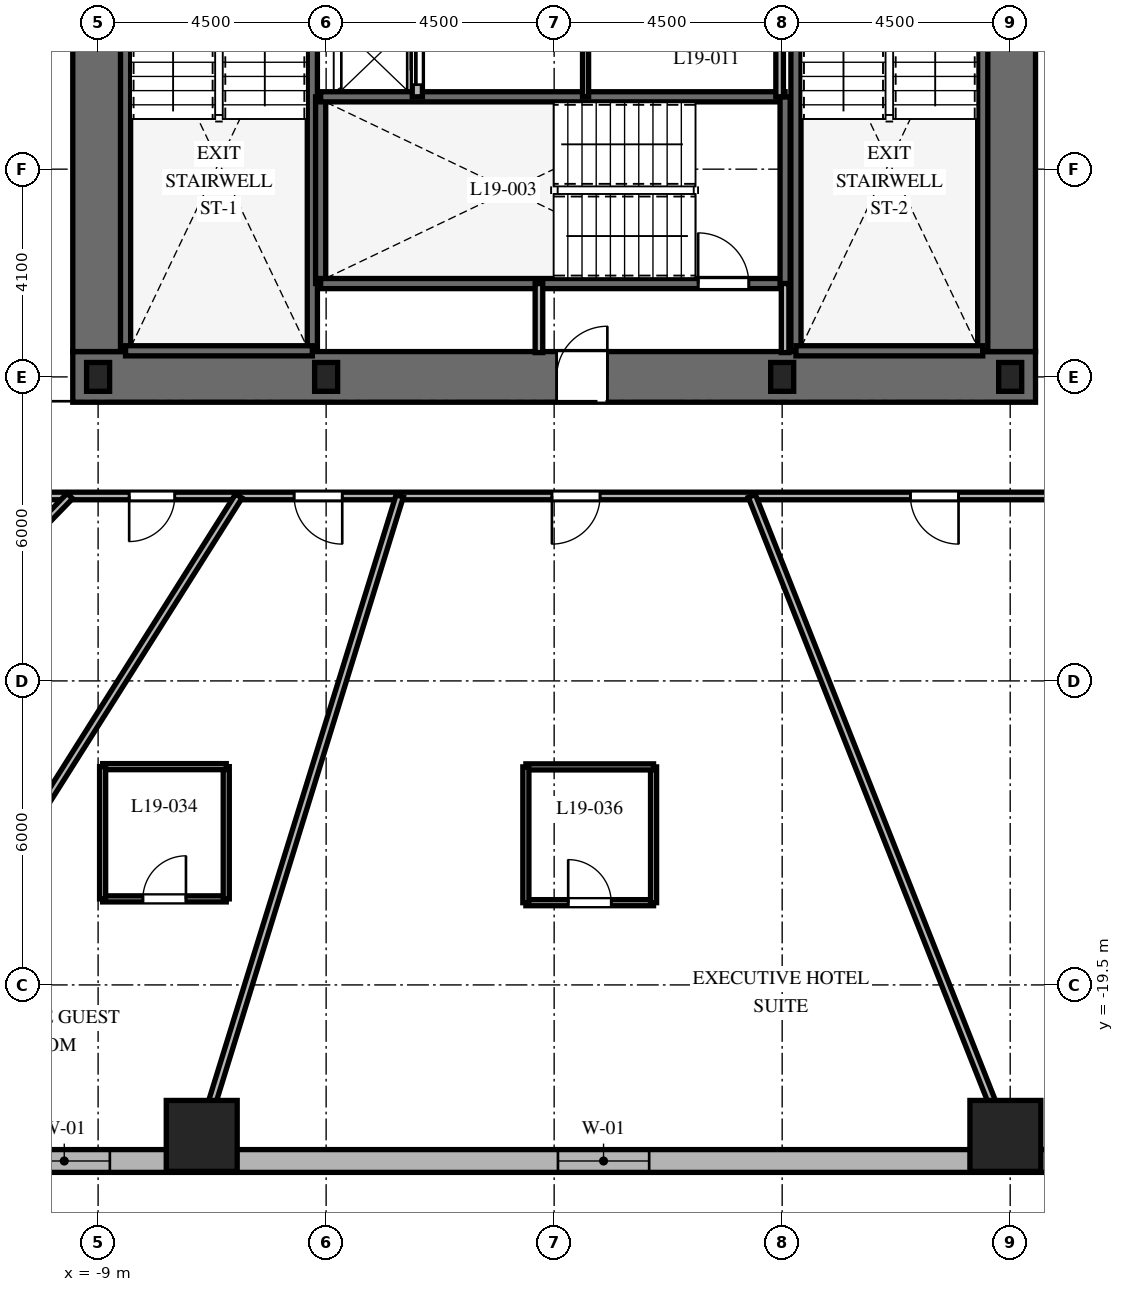
"""IFC4 building model, lengths in metres.
Left out: names, types, materials, properties, quantities, classifications, styles, units other than length and angle.
Written with IfcOpenShell. Run it as: python <this file> out.ifc"""

import sys

from ifc_helpers import new_model, si_unit, direction, frame, frame_2d, origin, origin_2d, place, context, subcontext, project, spatial, rectangle, i_section, extrude, element, fill, save


model = new_model("IFC4")
c1 = context("Model", 3, precision=1e-05, world=origin(), true_north=direction((0.0, 1.0)))
c2 = subcontext(c1, "Body", "Model", "MODEL_VIEW")
j1 = project(units=[si_unit("LENGTHUNIT", "METRE"), si_unit("PLANEANGLEUNIT", "RADIAN")], contexts=[c1])
p1 = place(None, origin())
s1 = spatial("IfcSite", under=j1, at=p1, CompositionType="ELEMENT")
p2 = place(p1, origin())
s2 = spatial("IfcBuilding", under=s1, at=p2, CompositionType="ELEMENT")
p3 = place(p2, frame((0.0, 0.0, 82.3)))
s3 = spatial("IfcBuildingStorey", under=s2, at=p3, CompositionType="ELEMENT", Elevation=82.3)
p4 = place(p3, frame((-9.5, -7.5, 0.0), z_axis=(0.0, 0.0, 1.0), x_axis=(1.0, 0.0, 0.0)))
e1 = element("IfcWall", 1, at=p4, inside=s3, PredefinedType="SHEAR", context=c2, shape_type="SweptSolid", body=[
    extrude(rectangle(XDim=19.0, YDim=1.0, at=frame_2d((9.5, 0.0))), origin(), (0.0, 0.0, 1.0), 3.7),
])
p5 = place(p4, frame((9.55, 0.0, 0.0)))
e2 = element("IfcOpeningElement", 2, at=p5, cuts=e1, PredefinedType="OPENING", context=c2, shape_type="SweptSolid", body=[
    extrude(rectangle(XDim=1.0, YDim=2.15, at=frame_2d((0.5, 1.075))), frame((0.0, 0.51, 0.0), z_axis=(0.0, -1.0, 0.0), x_axis=(1.0, 0.0, 0.0)), (0.0, 0.0, 1.0), 1.02),
])
p6 = place(p3, frame((-9.0, -7.0, 0.0), z_axis=(0.0, 0.0, 1.0), x_axis=(0.0, 1.0, 0.0)))
e3 = element("IfcWall", 3, at=p6, inside=s3, PredefinedType="SHEAR", context=c2, shape_type="SweptSolid", body=[
    extrude(rectangle(XDim=14.0, YDim=1.0, at=frame_2d((7.0, 0.0))), origin(), (0.0, 0.0, 1.0), 3.7),
])
p7 = place(p6, frame((10.125, 0.0, 0.0)))
e4 = element("IfcOpeningElement", 4, at=p7, cuts=e3, PredefinedType="OPENING", context=c2, shape_type="SweptSolid", body=[
    extrude(rectangle(XDim=1.05, YDim=2.15, at=frame_2d((0.525, 1.075))), frame((0.0, 0.51, 0.0), z_axis=(0.0, -1.0, 0.0), x_axis=(1.0, 0.0, 0.0)), (0.0, 0.0, 1.0), 1.02),
])
p8 = place(p3, frame((9.0, -7.0, 0.0), z_axis=(0.0, 0.0, 1.0), x_axis=(0.0, 1.0, 0.0)))
e5 = element("IfcWall", 5, at=p8, inside=s3, PredefinedType="SHEAR", context=c2, shape_type="SweptSolid", body=[
    extrude(rectangle(XDim=14.0, YDim=1.0, at=frame_2d((7.0, 0.0))), origin(), (0.0, 0.0, 1.0), 3.7),
])
p9 = place(p8, frame((10.125, 0.0, 0.0)))
e6 = element("IfcOpeningElement", 6, at=p9, cuts=e5, PredefinedType="OPENING", context=c2, shape_type="SweptSolid", body=[
    extrude(rectangle(XDim=1.05, YDim=2.15, at=frame_2d((0.525, 1.075))), frame((0.0, 0.51, 0.0), z_axis=(0.0, -1.0, 0.0), x_axis=(1.0, 0.0, 0.0)), (0.0, 0.0, 1.0), 1.02),
])
for number, where, z_axis, x_axis in (
    (7, (-8.458, -6.985, 0.0), (0.0, 0.0, 1.0), (0.0, 1.0, 0.0)),
    (8, (-4.772, -6.985, 0.0), (0.0, 0.0, 1.0), (0.0, 1.0, 0.0)),
):
    element("IfcWall", number, at=place(p3, frame(where, z_axis=z_axis, x_axis=x_axis)), inside=s3, PredefinedType="SHEAR", context=c2, shape_type="SweptSolid", body=[
        extrude(rectangle(XDim=9.143, YDim=0.2, at=frame_2d((4.572, 0.0))), origin(), (0.0, 0.0, 1.0), 3.7),
    ])
p10 = place(p3, frame((-8.458, -6.985, 0.0), z_axis=(0.0, 0.0, 1.0), x_axis=(1.0, 0.0, 0.0)))
e9 = element("IfcWall", 9, at=p10, inside=s3, PredefinedType="SHEAR", context=c2, shape_type="SweptSolid", body=[
    extrude(rectangle(XDim=3.686, YDim=0.2, at=frame_2d((1.843, 0.0))), origin(), (0.0, 0.0, 1.0), 3.7),
])
for number, where, z_axis, x_axis in (
    (10, (4.772, -6.985, 0.0), (0.0, 0.0, 1.0), (0.0, 1.0, 0.0)),
    (11, (8.458, -6.985, 0.0), (0.0, 0.0, 1.0), (0.0, 1.0, 0.0)),
):
    element("IfcWall", number, at=place(p3, frame(where, z_axis=z_axis, x_axis=x_axis)), inside=s3, PredefinedType="SHEAR", context=c2, shape_type="SweptSolid", body=[
        extrude(rectangle(XDim=9.143, YDim=0.2, at=frame_2d((4.572, 0.0))), origin(), (0.0, 0.0, 1.0), 3.7),
    ])
for number, where, z_axis, x_axis in (
    (12, (4.772, -6.985, 0.0), (0.0, 0.0, 1.0), (1.0, 0.0, 0.0)),
    (13, (-4.608, -5.658, 0.0), (0.0, 0.0, 1.0), (0.0, 1.0, 0.0)),
):
    element("IfcWall", number, at=place(p3, frame(where, z_axis=z_axis, x_axis=x_axis)), inside=s3, PredefinedType="SHEAR", context=c2, shape_type="SweptSolid", body=[
        extrude(rectangle(XDim=3.686, YDim=0.2, at=frame_2d((1.843, 0.0))), origin(), (0.0, 0.0, 1.0), 3.7),
    ])
p11 = place(p3, frame((-4.608, -5.658, 0.0), z_axis=(0.0, 0.0, 1.0), x_axis=(1.0, 0.0, 0.0)))
e14 = element("IfcWall", 14, at=p11, inside=s3, PredefinedType="SHEAR", context=c2, shape_type="SweptSolid", body=[
    extrude(rectangle(XDim=9.166, YDim=0.2, at=frame_2d((4.583, 0.0))), origin(), (0.0, 0.0, 1.0), 3.7),
])
p12 = place(p11, frame((7.45, 0.0, 0.0)))
e15 = element("IfcOpeningElement", 15, at=p12, cuts=e14, PredefinedType="OPENING", context=c2, shape_type="SweptSolid", body=[
    extrude(rectangle(XDim=1.0, YDim=2.15, at=frame_2d((0.5, 1.075))), frame((0.0, 0.11, 0.0), z_axis=(0.0, -1.0, 0.0), x_axis=(1.0, 0.0, 0.0)), (0.0, 0.0, 1.0), 0.22),
])
p13 = place(p3, frame((-4.608, -1.972, 0.0), z_axis=(0.0, 0.0, 1.0), x_axis=(1.0, 0.0, 0.0)))
e16 = element("IfcWall", 16, at=p13, inside=s3, PredefinedType="SHEAR", context=c2, shape_type="SweptSolid", body=[
    extrude(rectangle(XDim=9.166, YDim=0.2, at=frame_2d((4.583, 0.0))), origin(), (0.0, 0.0, 1.0), 3.7),
])
p14 = place(p3, frame((4.558, -5.658, 0.0), z_axis=(0.0, 0.0, 1.0), x_axis=(0.0, 1.0, 0.0)))
e17 = element("IfcWall", 17, at=p14, inside=s3, PredefinedType="SHEAR", context=c2, shape_type="SweptSolid", body=[
    extrude(rectangle(XDim=3.686, YDim=0.2, at=frame_2d((1.843, 0.0))), origin(), (0.0, 0.0, 1.0), 3.7),
])
for number, where, z_axis, x_axis in (
    (18, (-9.0, -7.5, 0.0), (0.0, 0.0, 1.0), (1.0, 0.0, 0.0)),
    (19, (-4.5, -7.5, 0.0), (0.0, 0.0, 1.0), (1.0, 0.0, 0.0)),
    (20, (4.5, -7.5, 0.0), (0.0, 0.0, 1.0), (1.0, 0.0, 0.0)),
    (21, (9.0, -7.5, 0.0), (0.0, 0.0, 1.0), (1.0, 0.0, 0.0)),
):
    element("IfcColumn", number, at=place(p3, frame(where, z_axis=z_axis, x_axis=x_axis)), inside=s3, PredefinedType="COLUMN", context=c2, shape_type="SweptSolid", body=[
        extrude(i_section(OverallWidth=0.454, OverallDepth=0.569, WebThickness=0.078, FlangeThickness=0.125, at=origin_2d()), origin(), (0.0, 0.0, 1.0), 3.7),
    ])
for number, where, z_axis, x_axis in (
    (22, (-6.955, -22.48, 0.0), (0.0, 0.0, 1.0), (1.0, 0.0, 0.0)),
    (23, (8.905, -22.48, 0.0), (0.0, 0.0, 1.0), (1.0, 0.0, 0.0)),
):
    element("IfcColumn", number, at=place(p3, frame(where, z_axis=z_axis, x_axis=x_axis)), inside=s3, PredefinedType="COLUMN", context=c2, shape_type="SweptSolid", body=[
        extrude(rectangle(XDim=1.4, YDim=1.4, at=origin_2d()), origin(), (0.0, 0.0, 1.0), 3.7),
    ])
p15 = place(p3, frame((-12.221, -22.975, 0.0), z_axis=(0.0, 0.0, 1.0), x_axis=(1.0, 0.0, 0.0)))
e24 = element("IfcWall", 24, at=p15, inside=s3, PredefinedType="SOLIDWALL", context=c2, shape_type="SweptSolid", body=[
    extrude(rectangle(XDim=26.389, YDim=0.45, at=frame_2d((13.195, 0.0))), origin(), (0.0, 0.0, 1.0), 3.38),
])
p16 = place(p15, frame((1.653, 0.0, 0.8)))
e25 = element("IfcOpeningElement", 25, at=p16, cuts=e24, PredefinedType="OPENING", context=c2, shape_type="SweptSolid", body=[
    extrude(rectangle(XDim=1.8, YDim=1.8, at=frame_2d((0.9, 0.9))), frame((0.0, 0.235, 0.0), z_axis=(0.0, -1.0, 0.0), x_axis=(1.0, 0.0, 0.0)), (0.0, 0.0, 1.0), 0.47),
])
p17 = place(p15, frame((12.296, 0.0, 0.8)))
e26 = element("IfcOpeningElement", 26, at=p17, cuts=e24, PredefinedType="OPENING", context=c2, shape_type="SweptSolid", body=[
    extrude(rectangle(XDim=1.8, YDim=1.8, at=frame_2d((0.9, 0.9))), frame((0.0, 0.235, 0.0), z_axis=(0.0, -1.0, 0.0), x_axis=(1.0, 0.0, 0.0)), (0.0, 0.0, 1.0), 0.47),
])
p18 = place(p15, frame((22.938, 0.0, 0.8)))
e27 = element("IfcOpeningElement", 27, at=p18, cuts=e24, PredefinedType="OPENING", context=c2, shape_type="SweptSolid", body=[
    extrude(rectangle(XDim=1.8, YDim=1.8, at=frame_2d((0.9, 0.9))), frame((0.0, 0.235, 0.0), z_axis=(0.0, -1.0, 0.0), x_axis=(1.0, 0.0, 0.0)), (0.0, 0.0, 1.0), 0.47),
])
for number, where, z_axis, x_axis in (
    (28, (-0.3, -7.02, 0.0), (0.0, 0.0, 1.0), (0.0, 1.0, 0.0)),
    (29, (4.558, -7.02, 0.0), (0.0, 0.0, 1.0), (0.0, 1.0, 0.0)),
):
    element("IfcWall", number, at=place(p3, frame(where, z_axis=z_axis, x_axis=x_axis)), inside=s3, PredefinedType="PARTITIONING", context=c2, shape_type="SweptSolid", body=[
        extrude(rectangle(XDim=1.362, YDim=0.15, at=frame_2d((0.681, 0.0))), origin(), (0.0, 0.0, 1.0), 3.38),
    ])
p19 = place(p3, frame((-2.7, -1.972, 0.0), z_axis=(0.0, 0.0, 1.0), x_axis=(0.0, 1.0, 0.0)))
e30 = element("IfcWall", 30, at=p19, inside=s3, PredefinedType="PARTITIONING", context=c2, shape_type="SweptSolid", body=[
    extrude(rectangle(XDim=1.472, YDim=0.2, at=frame_2d((0.736, 0.0))), origin(), (0.0, 0.0, 1.0), 3.38),
])
p20 = place(p19, frame((0.24, 0.0, 0.0)))
e31 = element("IfcOpeningElement", 31, at=p20, cuts=e30, PredefinedType="OPENING", context=c2, shape_type="SweptSolid", body=[
    extrude(rectangle(XDim=1.0, YDim=2.2, at=frame_2d((0.5, 1.1))), frame((0.0, 0.11, 0.0), z_axis=(0.0, -1.0, 0.0), x_axis=(1.0, 0.0, 0.0)), (0.0, 0.0, 1.0), 0.22),
])
p21 = place(p3, frame((4.45, -1.972, 0.0), z_axis=(0.0, 0.0, 1.0), x_axis=(0.0, 1.0, 0.0)))
e32 = element("IfcWall", 32, at=p21, inside=s3, PredefinedType="PARTITIONING", context=c2, shape_type="SweptSolid", body=[
    extrude(rectangle(XDim=4.222, YDim=0.15, at=frame_2d((2.111, 0.0))), origin(), (0.0, 0.0, 1.0), 3.38),
])
p22 = place(p3, frame((0.62, -1.972, 0.0), z_axis=(0.0, 0.0, 1.0), x_axis=(0.0, 1.0, 0.0)))
e33 = element("IfcWall", 33, at=p22, inside=s3, PredefinedType="PARTITIONING", context=c2, shape_type="SweptSolid", body=[
    extrude(rectangle(XDim=1.472, YDim=0.12, at=frame_2d((0.736, 0.0))), origin(), (0.0, 0.0, 1.0), 3.38),
])
p23 = place(p3, frame((11.35, -9.85, 0.0), z_axis=(0.0, 0.0, 1.0), x_axis=(-1.0, 0.0, 0.0)))
e34 = element("IfcWall", 34, at=p23, inside=s3, PredefinedType="PARTITIONING", context=c2, shape_type="SweptSolid", body=[
    extrude(rectangle(XDim=22.7, YDim=0.15, at=frame_2d((11.35, 0.0))), origin(), (0.0, 0.0, 1.0), 2.82),
])
p24 = place(p23, frame((18.837, 0.0, 0.0)))
e35 = element("IfcOpeningElement", 35, at=p24, cuts=e34, PredefinedType="OPENING", context=c2, shape_type="SweptSolid", body=[
    extrude(rectangle(XDim=0.9, YDim=2.03, at=frame_2d((0.45, 1.015))), frame((0.0, 0.085, 0.0), z_axis=(0.0, -1.0, 0.0), x_axis=(1.0, 0.0, 0.0)), (0.0, 0.0, 1.0), 0.17),
])
p25 = place(p23, frame((15.532, 0.0, 0.0)))
e36 = element("IfcOpeningElement", 36, at=p25, cuts=e34, PredefinedType="OPENING", context=c2, shape_type="SweptSolid", body=[
    extrude(rectangle(XDim=0.95, YDim=2.03, at=frame_2d((0.475, 1.015))), frame((0.0, 0.085, 0.0), z_axis=(0.0, -1.0, 0.0), x_axis=(1.0, 0.0, 0.0)), (0.0, 0.0, 1.0), 0.17),
])
p26 = place(p23, frame((10.444, 0.0, 0.0)))
e37 = element("IfcOpeningElement", 37, at=p26, cuts=e34, PredefinedType="OPENING", context=c2, shape_type="SweptSolid", body=[
    extrude(rectangle(XDim=0.95, YDim=2.03, at=frame_2d((0.475, 1.015))), frame((0.0, 0.085, 0.0), z_axis=(0.0, -1.0, 0.0), x_axis=(1.0, 0.0, 0.0)), (0.0, 0.0, 1.0), 0.17),
])
p27 = place(p23, frame((3.369, 0.0, 0.0)))
e38 = element("IfcOpeningElement", 38, at=p27, cuts=e34, PredefinedType="OPENING", context=c2, shape_type="SweptSolid", body=[
    extrude(rectangle(XDim=0.95, YDim=2.03, at=frame_2d((0.475, 1.015))), frame((0.0, 0.085, 0.0), z_axis=(0.0, -1.0, 0.0), x_axis=(1.0, 0.0, 0.0)), (0.0, 0.0, 1.0), 0.17),
])
p28 = place(p3, frame((-9.558, -9.85, 0.0), z_axis=(0.0, 0.0, 1.0), x_axis=(-0.69638346089, -0.717669893056, 0.0)))
e39 = element("IfcWall", 39, at=p28, inside=s3, PredefinedType="PARTITIONING", context=c2, shape_type="SweptSolid", body=[
    extrude(rectangle(XDim=10.701, YDim=0.15, at=frame_2d((5.351, 0.0))), origin(), (0.0, 0.0, 1.0), 2.52),
])
p29 = place(p3, frame((-6.222, -9.85, 0.0), z_axis=(0.0, 0.0, 1.0), x_axis=(-0.534069056435, -0.845440857162, 0.0)))
e40 = element("IfcWall", 40, at=p29, inside=s3, PredefinedType="PARTITIONING", context=c2, shape_type="SweptSolid", body=[
    extrude(rectangle(XDim=14.611, YDim=0.15, at=frame_2d((7.306, 0.0))), origin(), (0.0, 0.0, 1.0), 2.52),
])
p30 = place(p3, frame((-3.048, -9.85, 0.0), z_axis=(0.0, 0.0, 1.0), x_axis=(-0.295553992761, -0.955326037206, 0.0)))
e41 = element("IfcWall", 41, at=p30, inside=s3, PredefinedType="PARTITIONING", context=c2, shape_type="SweptSolid", body=[
    extrude(rectangle(XDim=13.739, YDim=0.15, at=frame_2d((6.869, 0.0))), origin(), (0.0, 0.0, 1.0), 2.52),
])
p31 = place(p3, frame((3.902, -9.85, 0.0), z_axis=(0.0, 0.0, 1.0), x_axis=(0.36828765711, -0.929711891728, 0.0)))
e42 = element("IfcWall", 42, at=p31, inside=s3, PredefinedType="PARTITIONING", context=c2, shape_type="SweptSolid", body=[
    extrude(rectangle(XDim=14.117, YDim=0.15, at=frame_2d((7.059, 0.0))), origin(), (0.0, 0.0, 1.0), 2.52),
])
p32 = place(p3, frame((-8.911, -17.802, 0.0), z_axis=(0.0, 0.0, 1.0), x_axis=(1.0, 0.0, 0.0)))
e43 = element("IfcWall", 43, at=p32, inside=s3, PredefinedType="PARTITIONING", context=c2, shape_type="SweptSolid", body=[
    extrude(rectangle(XDim=2.44, YDim=0.12, at=frame_2d((1.22, 0.0))), origin(), (0.0, 0.0, 1.0), 2.82),
])
p33 = place(p32, frame((0.795, 0.0, 0.0)))
e44 = element("IfcOpeningElement", 44, at=p33, cuts=e43, PredefinedType="OPENING", context=c2, shape_type="SweptSolid", body=[
    extrude(rectangle(XDim=0.85, YDim=2.03, at=frame_2d((0.425, 1.015))), frame((0.0, 0.07, 0.0), z_axis=(0.0, -1.0, 0.0), x_axis=(1.0, 0.0, 0.0)), (0.0, 0.0, 1.0), 0.14),
])
p34 = place(p3, frame((-6.471, -17.802, 0.0), z_axis=(0.0, 0.0, 1.0), x_axis=(0.0, 1.0, 0.0)))
e45 = element("IfcWall", 45, at=p34, inside=s3, PredefinedType="PARTITIONING", context=c2, shape_type="SweptSolid", body=[
    extrude(rectangle(XDim=2.61, YDim=0.12, at=frame_2d((1.305, 0.0))), origin(), (0.0, 0.0, 1.0), 2.82),
])
p35 = place(p3, frame((-6.471, -15.192, 0.0), z_axis=(0.0, 0.0, 1.0), x_axis=(-1.0, 0.0, 0.0)))
e46 = element("IfcWall", 46, at=p35, inside=s3, PredefinedType="PARTITIONING", context=c2, shape_type="SweptSolid", body=[
    extrude(rectangle(XDim=2.44, YDim=0.12, at=frame_2d((1.22, 0.0))), origin(), (0.0, 0.0, 1.0), 2.82),
])
p36 = place(p3, frame((-8.911, -15.192, 0.0), z_axis=(0.0, 0.0, 1.0), x_axis=(0.0, -1.0, 0.0)))
e47 = element("IfcWall", 47, at=p36, inside=s3, PredefinedType="PARTITIONING", context=c2, shape_type="SweptSolid", body=[
    extrude(rectangle(XDim=2.61, YDim=0.12, at=frame_2d((1.305, 0.0))), origin(), (0.0, 0.0, 1.0), 2.952),
])
p37 = place(p3, frame((-0.558, -17.877, 0.0), z_axis=(0.0, 0.0, 1.0), x_axis=(1.0, 0.0, 0.0)))
e48 = element("IfcWall", 48, at=p37, inside=s3, PredefinedType="PARTITIONING", context=c2, shape_type="SweptSolid", body=[
    extrude(rectangle(XDim=2.52, YDim=0.12, at=frame_2d((1.26, 0.0))), origin(), (0.0, 0.0, 1.0), 2.82),
])
p38 = place(p37, frame((0.835, 0.0, 0.0)))
e49 = element("IfcOpeningElement", 49, at=p38, cuts=e48, PredefinedType="OPENING", context=c2, shape_type="SweptSolid", body=[
    extrude(rectangle(XDim=0.85, YDim=2.03, at=frame_2d((0.425, 1.015))), frame((0.0, 0.07, 0.0), z_axis=(0.0, -1.0, 0.0), x_axis=(1.0, 0.0, 0.0)), (0.0, 0.0, 1.0), 0.14),
])
p39 = place(p3, frame((1.962, -17.877, 0.0), z_axis=(0.0, 0.0, 1.0), x_axis=(0.0, 1.0, 0.0)))
e50 = element("IfcWall", 50, at=p39, inside=s3, PredefinedType="PARTITIONING", context=c2, shape_type="SweptSolid", body=[
    extrude(rectangle(XDim=2.68, YDim=0.12, at=frame_2d((1.34, 0.0))), origin(), (0.0, 0.0, 1.0), 2.82),
])
p40 = place(p3, frame((1.962, -15.197, 0.0), z_axis=(0.0, 0.0, 1.0), x_axis=(-1.0, 0.0, 0.0)))
e51 = element("IfcWall", 51, at=p40, inside=s3, PredefinedType="PARTITIONING", context=c2, shape_type="SweptSolid", body=[
    extrude(rectangle(XDim=2.52, YDim=0.12, at=frame_2d((1.26, 0.0))), origin(), (0.0, 0.0, 1.0), 3.38),
])
p41 = place(p3, frame((-0.558, -15.197, 0.0), z_axis=(0.0, 0.0, 1.0), x_axis=(0.0, -1.0, 0.0)))
e52 = element("IfcWall", 52, at=p41, inside=s3, PredefinedType="PARTITIONING", context=c2, shape_type="SweptSolid", body=[
    extrude(rectangle(XDim=2.68, YDim=0.12, at=frame_2d((1.34, 0.0))), origin(), (0.0, 0.0, 1.0), 2.82),
])
p42 = place(p16, origin())
e53 = element("IfcWindow", 53, at=p42, inside=s3, PartitioningType="SINGLE_PANEL", PredefinedType="WINDOW", context=c2, shape_type="SweptSolid", body=[
    extrude(rectangle(XDim=1.8, YDim=1.8, at=frame_2d((0.9, 0.9))), frame((0.0, 0.03, 0.0), z_axis=(0.0, -1.0, 0.0), x_axis=(1.0, 0.0, 0.0)), (0.0, 0.0, 1.0), 0.06),
])
fill(e25, e53)
p43 = place(p17, origin())
e54 = element("IfcWindow", 54, at=p43, inside=s3, PartitioningType="SINGLE_PANEL", PredefinedType="WINDOW", context=c2, shape_type="SweptSolid", body=[
    extrude(rectangle(XDim=1.8, YDim=1.8, at=frame_2d((0.9, 0.9))), frame((0.0, 0.03, 0.0), z_axis=(0.0, -1.0, 0.0), x_axis=(1.0, 0.0, 0.0)), (0.0, 0.0, 1.0), 0.06),
])
fill(e26, e54)
p44 = place(p12, origin())
e55 = element("IfcDoor", 55, at=p44, inside=s3, OperationType="SINGLE_SWING_LEFT", PredefinedType="DOOR", context=c2, shape_type="SweptSolid", body=[
    extrude(rectangle(XDim=1.0, YDim=2.15, at=frame_2d((0.5, 1.075))), frame((0.0, 0.025, 0.0), z_axis=(0.0, -1.0, 0.0), x_axis=(1.0, 0.0, 0.0)), (0.0, 0.0, 1.0), 0.05),
])
fill(e15, e55)
p45 = place(p5, origin())
e56 = element("IfcDoor", 56, at=p45, inside=s3, OperationType="SINGLE_SWING_RIGHT", PredefinedType="DOOR", context=c2, shape_type="SweptSolid", body=[
    extrude(rectangle(XDim=1.0, YDim=2.15, at=frame_2d((0.5, 1.075))), frame((0.0, 0.025, 0.0), z_axis=(0.0, -1.0, 0.0), x_axis=(1.0, 0.0, 0.0)), (0.0, 0.0, 1.0), 0.05),
])
fill(e2, e56)
p46 = place(p20, origin())
e57 = element("IfcDoor", 57, at=p46, inside=s3, OperationType="SLIDING_TO_LEFT", PredefinedType="DOOR", context=c2, shape_type="SweptSolid", body=[
    extrude(rectangle(XDim=1.0, YDim=2.2, at=frame_2d((0.5, 1.1))), frame((0.0, 0.025, 0.0), z_axis=(0.0, -1.0, 0.0), x_axis=(1.0, 0.0, 0.0)), (0.0, 0.0, 1.0), 0.05),
])
fill(e31, e57)
p47 = place(p24, origin())
e58 = element("IfcDoor", 58, at=p47, inside=s3, OperationType="SINGLE_SWING_RIGHT", PredefinedType="DOOR", context=c2, shape_type="SweptSolid", body=[
    extrude(rectangle(XDim=0.9, YDim=2.03, at=frame_2d((0.45, 1.015))), frame((0.0, 0.025, 0.0), z_axis=(0.0, -1.0, 0.0), x_axis=(1.0, 0.0, 0.0)), (0.0, 0.0, 1.0), 0.05),
])
fill(e35, e58)
p48 = place(p25, origin())
e59 = element("IfcDoor", 59, at=p48, inside=s3, OperationType="SINGLE_SWING_LEFT", PredefinedType="DOOR", context=c2, shape_type="SweptSolid", body=[
    extrude(rectangle(XDim=0.95, YDim=2.03, at=frame_2d((0.475, 1.015))), frame((0.0, 0.025, 0.0), z_axis=(0.0, -1.0, 0.0), x_axis=(1.0, 0.0, 0.0)), (0.0, 0.0, 1.0), 0.05),
])
fill(e36, e59)
p49 = place(p33, origin())
e60 = element("IfcDoor", 60, at=p49, inside=s3, OperationType="SINGLE_SWING_RIGHT", PredefinedType="DOOR", context=c2, shape_type="SweptSolid", body=[
    extrude(rectangle(XDim=0.85, YDim=2.03, at=frame_2d((0.425, 1.015))), frame((0.0, 0.025, 0.0), z_axis=(0.0, -1.0, 0.0), x_axis=(1.0, 0.0, 0.0)), (0.0, 0.0, 1.0), 0.05),
])
fill(e44, e60)
p50 = place(p26, origin())
e61 = element("IfcDoor", 61, at=p50, inside=s3, OperationType="SINGLE_SWING_RIGHT", PredefinedType="DOOR", context=c2, shape_type="SweptSolid", body=[
    extrude(rectangle(XDim=0.95, YDim=2.03, at=frame_2d((0.475, 1.015))), frame((0.0, 0.025, 0.0), z_axis=(0.0, -1.0, 0.0), x_axis=(1.0, 0.0, 0.0)), (0.0, 0.0, 1.0), 0.05),
])
fill(e37, e61)
p51 = place(p38, origin())
e62 = element("IfcDoor", 62, at=p51, inside=s3, OperationType="SINGLE_SWING_LEFT", PredefinedType="DOOR", context=c2, shape_type="SweptSolid", body=[
    extrude(rectangle(XDim=0.85, YDim=2.03, at=frame_2d((0.425, 1.015))), frame((0.0, 0.025, 0.0), z_axis=(0.0, -1.0, 0.0), x_axis=(1.0, 0.0, 0.0)), (0.0, 0.0, 1.0), 0.05),
])
fill(e49, e62)
p52 = place(p27, origin())
e63 = element("IfcDoor", 63, at=p52, inside=s3, OperationType="SINGLE_SWING_LEFT", PredefinedType="DOOR", context=c2, shape_type="SweptSolid", body=[
    extrude(rectangle(XDim=0.95, YDim=2.03, at=frame_2d((0.475, 1.015))), frame((0.0, 0.025, 0.0), z_axis=(0.0, -1.0, 0.0), x_axis=(1.0, 0.0, 0.0)), (0.0, 0.0, 1.0), 0.05),
])
fill(e38, e63)
save(model, sys.argv[1])
